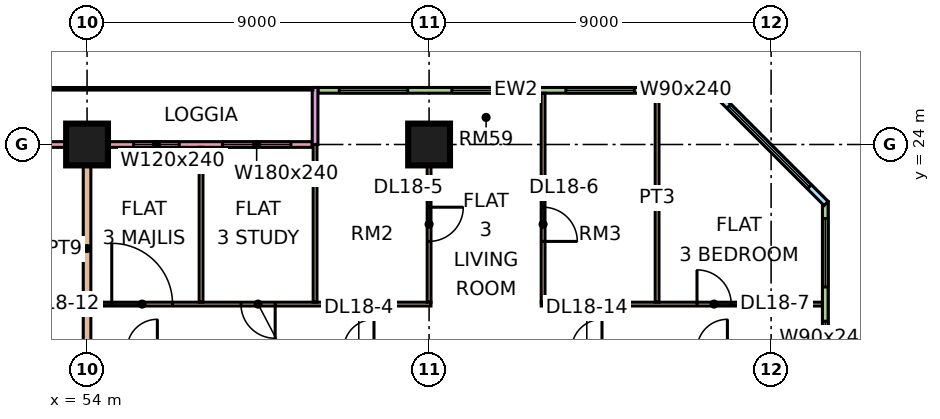
"""IFC4 building model, lengths in metres.
Left out: names, types, materials, properties, quantities, classifications, styles, units other than length and angle.
Written with IfcOpenShell. Run it as: python <this file> out.ifc"""

import sys

from ifc_helpers import new_model, si_unit, direction, frame, frame_2d, origin, origin_2d, place, context, subcontext, project, spatial, rectangle, extrude, element, fill, save


model = new_model("IFC4")
c1 = context("Model", 3, precision=1e-05, world=origin(), true_north=direction((0.0, 1.0)))
c2 = subcontext(c1, "Body", "Model", "MODEL_VIEW")
j1 = project(units=[si_unit("LENGTHUNIT", "METRE"), si_unit("PLANEANGLEUNIT", "RADIAN")], contexts=[c1])
p1 = place(None, origin())
s1 = spatial("IfcSite", under=j1, at=p1, CompositionType="ELEMENT")
p2 = place(p1, origin())
s2 = spatial("IfcBuilding", under=s1, at=p2, CompositionType="ELEMENT")
p3 = place(p2, frame((0.0, 0.0, 82.65)))
s3 = spatial("IfcBuildingStorey", under=s2, at=p3, CompositionType="ELEMENT", Elevation=82.65)
for number, where, z_axis, x_axis in (
    (1, (54.0, 24.0, 0.0), (0.0, 0.0, 1.0), (1.0, 0.0, 0.0)),
    (2, (63.0, 24.0, 0.0), (0.0, 0.0, 1.0), (1.0, 0.0, 0.0)),
):
    element("IfcColumn", number, at=place(p3, frame(where, z_axis=z_axis, x_axis=x_axis)), inside=s3, PredefinedType="COLUMN", context=c2, shape_type="SweptSolid", body=[
        extrude(rectangle(XDim=1.1, YDim=1.1, at=origin_2d()), origin(), (0.0, 0.0, 1.0), 3.75),
    ])
p4 = place(p3, frame((70.5, 25.425, 0.0), z_axis=(0.0, 0.0, 1.0), x_axis=(-1.0, 0.0, 0.0)))
e3 = element("IfcWall", 3, at=p4, inside=s3, PredefinedType="SOLIDWALL", context=c2, shape_type="SweptSolid", body=[
    extrude(rectangle(XDim=10.425, YDim=0.15, at=frame_2d((5.212, 0.0))), origin(), (0.0, 0.0, 1.0), 3.3),
])
p5 = place(p4, frame((0.3, 0.0, 0.45)))
e4 = element("IfcOpeningElement", 4, at=p5, cuts=e3, PredefinedType="OPENING", context=c2, shape_type="SweptSolid", body=[
    extrude(rectangle(XDim=0.9, YDim=2.4, at=frame_2d((0.45, 1.2))), frame((0.0, 0.085, 0.0), z_axis=(0.0, -1.0, 0.0), x_axis=(1.0, 0.0, 0.0)), (0.0, 0.0, 1.0), 0.17),
])
p6 = place(p4, frame((2.1, 0.0, 0.45)))
e5 = element("IfcOpeningElement", 5, at=p6, cuts=e3, PredefinedType="OPENING", context=c2, shape_type="SweptSolid", body=[
    extrude(rectangle(XDim=1.8, YDim=2.4, at=frame_2d((0.9, 1.2))), frame((0.0, 0.085, 0.0), z_axis=(0.0, -1.0, 0.0), x_axis=(1.0, 0.0, 0.0)), (0.0, 0.0, 1.0), 0.17),
])
p7 = place(p4, frame((5.1, 0.0, 0.45)))
e6 = element("IfcOpeningElement", 6, at=p7, cuts=e3, PredefinedType="OPENING", context=c2, shape_type="SweptSolid", body=[
    extrude(rectangle(XDim=1.8, YDim=2.4, at=frame_2d((0.9, 1.2))), frame((0.0, 0.085, 0.0), z_axis=(0.0, -1.0, 0.0), x_axis=(1.0, 0.0, 0.0)), (0.0, 0.0, 1.0), 0.17),
])
p8 = place(p4, frame((8.062, 0.0, 0.45)))
e7 = element("IfcOpeningElement", 7, at=p8, cuts=e3, PredefinedType="OPENING", context=c2, shape_type="SweptSolid", body=[
    extrude(rectangle(XDim=1.8, YDim=2.4, at=frame_2d((0.9, 1.2))), frame((0.0, 0.085, 0.0), z_axis=(0.0, -1.0, 0.0), x_axis=(1.0, 0.0, 0.0)), (0.0, 0.0, 1.0), 0.17),
])
p9 = place(p3, frame((59.925, 24.0, 0.0), z_axis=(0.0, 0.0, 1.0), x_axis=(-1.0, 0.0, 0.0)))
e8 = element("IfcWall", 8, at=p9, inside=s3, PredefinedType="SOLIDWALL", context=c2, shape_type="SweptSolid", body=[
    extrude(rectangle(XDim=11.85, YDim=0.15, at=frame_2d((5.925, 0.0))), origin(), (0.0, 0.0, 1.0), 3.3),
])
p10 = place(p9, frame((0.562, 0.0, 0.45)))
e9 = element("IfcOpeningElement", 9, at=p10, cuts=e8, PredefinedType="OPENING", context=c2, shape_type="SweptSolid", body=[
    extrude(rectangle(XDim=1.8, YDim=2.4, at=frame_2d((0.9, 1.2))), frame((0.0, 0.085, 0.0), z_axis=(0.0, -1.0, 0.0), x_axis=(1.0, 0.0, 0.0)), (0.0, 0.0, 1.0), 0.17),
])
p11 = place(p9, frame((3.5, 0.0, 0.45)))
e10 = element("IfcOpeningElement", 10, at=p11, cuts=e8, PredefinedType="OPENING", context=c2, shape_type="SweptSolid", body=[
    extrude(rectangle(XDim=1.2, YDim=2.4, at=frame_2d((0.6, 1.2))), frame((0.0, 0.085, 0.0), z_axis=(0.0, -1.0, 0.0), x_axis=(1.0, 0.0, 0.0)), (0.0, 0.0, 1.0), 0.17),
])
p12 = place(p9, frame((7.113, 0.0, 0.45)))
e11 = element("IfcOpeningElement", 11, at=p12, cuts=e8, PredefinedType="OPENING", context=c2, shape_type="SweptSolid", body=[
    extrude(rectangle(XDim=4.2, YDim=2.4, at=frame_2d((2.1, 1.2))), frame((0.0, 0.085, 0.0), z_axis=(0.0, -1.0, 0.0), x_axis=(1.0, 0.0, 0.0)), (0.0, 0.0, 1.0), 0.17),
])
p13 = place(p3, frame((60.0, 25.5, 0.0), z_axis=(0.0, 0.0, 1.0), x_axis=(0.0, -1.0, 0.0)))
e12 = element("IfcWall", 12, at=p13, inside=s3, PredefinedType="SOLIDWALL", context=c2, shape_type="SweptSolid", body=[
    extrude(rectangle(XDim=1.5, YDim=0.15, at=frame_2d((0.75, 0.0))), origin(), (0.0, 0.0, 1.0), 3.3),
])
p14 = place(p3, frame((73.425, 12.075, 0.0), z_axis=(0.0, 0.0, 1.0), x_axis=(0.0, 1.0, 0.0)))
e13 = element("IfcWall", 13, at=p14, inside=s3, PredefinedType="SOLIDWALL", context=c2, shape_type="SweptSolid", body=[
    extrude(rectangle(XDim=10.425, YDim=0.15, at=frame_2d((5.212, 0.0))), origin(), (0.0, 0.0, 1.0), 3.3),
])
p15 = place(p14, frame((6.375, 0.0, 0.45)))
e14 = element("IfcOpeningElement", 14, at=p15, cuts=e13, PredefinedType="OPENING", context=c2, shape_type="SweptSolid", body=[
    extrude(rectangle(XDim=0.9, YDim=2.4, at=frame_2d((0.45, 1.2))), frame((0.0, 0.085, 0.0), z_axis=(0.0, -1.0, 0.0), x_axis=(1.0, 0.0, 0.0)), (0.0, 0.0, 1.0), 0.17),
])
p16 = place(p14, frame((8.175, 0.0, 0.45)))
e15 = element("IfcOpeningElement", 15, at=p16, cuts=e13, PredefinedType="OPENING", context=c2, shape_type="SweptSolid", body=[
    extrude(rectangle(XDim=1.8, YDim=2.4, at=frame_2d((0.9, 1.2))), frame((0.0, 0.085, 0.0), z_axis=(0.0, -1.0, 0.0), x_axis=(1.0, 0.0, 0.0)), (0.0, 0.0, 1.0), 0.17),
])
p17 = place(p3, frame((73.447, 22.447, 0.0), z_axis=(0.0, 0.0, 1.0), x_axis=(-0.707106781187, 0.707106781187, 0.0)))
e16 = element("IfcWall", 16, at=p17, inside=s3, PredefinedType="SOLIDWALL", context=c2, shape_type="SweptSolid", body=[
    extrude(rectangle(XDim=4.243, YDim=0.15, at=frame_2d((2.121, 0.0))), origin(), (0.0, 0.0, 1.0), 3.3),
])
p18 = place(p17, frame((0.621, 0.0, 0.45)))
e17 = element("IfcOpeningElement", 17, at=p18, cuts=e16, PredefinedType="OPENING", context=c2, shape_type="SweptSolid", body=[
    extrude(rectangle(XDim=3.0, YDim=2.4, at=frame_2d((1.5, 1.2))), frame((0.0, 0.085, 0.0), z_axis=(0.0, -1.0, 0.0), x_axis=(1.0, 0.0, 0.0)), (0.0, 0.0, 1.0), 0.17),
])
p19 = place(p3, frame((54.0, 18.6, 0.0), z_axis=(0.0, 0.0, 1.0), x_axis=(0.0, 1.0, 0.0)))
e18 = element("IfcWall", 18, at=p19, inside=s3, PredefinedType="PARTITIONING", context=c2, shape_type="SweptSolid", body=[
    extrude(rectangle(XDim=5.326, YDim=0.2, at=frame_2d((2.663, 0.0))), origin(), (0.0, 0.0, 1.0), 3.3),
])
p20 = place(p3, frame((54.1, 19.8, 0.0), z_axis=(0.0, 0.0, 1.0), x_axis=(1.0, 0.0, 0.0)))
e19 = element("IfcWall", 19, at=p20, inside=s3, PredefinedType="PARTITIONING", context=c2, shape_type="SweptSolid", body=[
    extrude(rectangle(XDim=8.95, YDim=0.1, at=frame_2d((4.475, 0.0))), origin(), (0.0, 0.0, 1.0), 3.3),
])
p21 = place(p20, frame((0.55, 0.0, 0.0)))
e20 = element("IfcOpeningElement", 20, at=p21, cuts=e19, PredefinedType="OPENING", context=c2, shape_type="SweptSolid", body=[
    extrude(rectangle(XDim=1.6, YDim=2.1, at=frame_2d((0.8, 1.05))), frame((0.0, 0.06, 0.0), z_axis=(0.0, -1.0, 0.0), x_axis=(1.0, 0.0, 0.0)), (0.0, 0.0, 1.0), 0.12),
])
p22 = place(p20, frame((3.95, 0.0, 0.0)))
e21 = element("IfcOpeningElement", 21, at=p22, cuts=e19, PredefinedType="OPENING", context=c2, shape_type="SweptSolid", body=[
    extrude(rectangle(XDim=0.9, YDim=2.1, at=frame_2d((0.45, 1.05))), frame((0.0, 0.06, 0.0), z_axis=(0.0, -1.0, 0.0), x_axis=(1.0, 0.0, 0.0)), (0.0, 0.0, 1.0), 0.12),
])
p23 = place(p3, frame((57.0, 19.85, 0.0), z_axis=(0.0, 0.0, 1.0), x_axis=(0.0, 1.0, 0.0)))
e22 = element("IfcWall", 22, at=p23, inside=s3, PredefinedType="PARTITIONING", context=c2, shape_type="SweptSolid", body=[
    extrude(rectangle(XDim=4.076, YDim=0.1, at=frame_2d((2.038, 0.0))), origin(), (0.0, 0.0, 1.0), 3.3),
])
p24 = place(p3, frame((60.0, 19.85, 0.0), z_axis=(0.0, 0.0, 1.0), x_axis=(0.0, 1.0, 0.0)))
e23 = element("IfcWall", 23, at=p24, inside=s3, PredefinedType="PARTITIONING", context=c2, shape_type="SweptSolid", body=[
    extrude(rectangle(XDim=4.15, YDim=0.1, at=frame_2d((2.075, 0.0))), origin(), (0.0, 0.0, 1.0), 3.3),
])
p25 = place(p3, frame((63.0, 19.85, 0.0), z_axis=(0.0, 0.0, 1.0), x_axis=(0.0, 1.0, 0.0)))
e24 = element("IfcWall", 24, at=p25, inside=s3, PredefinedType="PARTITIONING", context=c2, shape_type="SweptSolid", body=[
    extrude(rectangle(XDim=4.15, YDim=0.1, at=frame_2d((2.075, 0.0))), origin(), (0.0, 0.0, 1.0), 3.3),
])
p26 = place(p25, frame((1.6, 0.0, 0.0)))
e25 = element("IfcOpeningElement", 25, at=p26, cuts=e24, PredefinedType="OPENING", context=c2, shape_type="SweptSolid", body=[
    extrude(rectangle(XDim=0.9, YDim=2.1, at=frame_2d((0.45, 1.05))), frame((0.0, 0.06, 0.0), z_axis=(0.0, -1.0, 0.0), x_axis=(1.0, 0.0, 0.0)), (0.0, 0.0, 1.0), 0.12),
])
p27 = place(p3, frame((65.95, 19.8, 0.0), z_axis=(0.0, 0.0, 1.0), x_axis=(1.0, 0.0, 0.0)))
e26 = element("IfcWall", 26, at=p27, inside=s3, PredefinedType="PARTITIONING", context=c2, shape_type="SweptSolid", body=[
    extrude(rectangle(XDim=7.401, YDim=0.1, at=frame_2d((3.701, 0.0))), origin(), (0.0, 0.0, 1.0), 3.3),
])
p28 = place(p27, frame((4.1, 0.0, 0.0)))
e27 = element("IfcOpeningElement", 27, at=p28, cuts=e26, PredefinedType="OPENING", context=c2, shape_type="SweptSolid", body=[
    extrude(rectangle(XDim=0.9, YDim=2.1, at=frame_2d((0.45, 1.05))), frame((0.0, 0.06, 0.0), z_axis=(0.0, -1.0, 0.0), x_axis=(1.0, 0.0, 0.0)), (0.0, 0.0, 1.0), 0.12),
])
p29 = place(p3, frame((66.0, 19.85, 0.0), z_axis=(0.0, 0.0, 1.0), x_axis=(0.0, 1.0, 0.0)))
e28 = element("IfcWall", 28, at=p29, inside=s3, PredefinedType="PARTITIONING", context=c2, shape_type="SweptSolid", body=[
    extrude(rectangle(XDim=5.5, YDim=0.1, at=frame_2d((2.75, 0.0))), origin(), (0.0, 0.0, 1.0), 3.3),
])
p30 = place(p29, frame((1.6, 0.0, 0.0)))
e29 = element("IfcOpeningElement", 29, at=p30, cuts=e28, PredefinedType="OPENING", context=c2, shape_type="SweptSolid", body=[
    extrude(rectangle(XDim=0.9, YDim=2.1, at=frame_2d((0.45, 1.05))), frame((0.0, 0.06, 0.0), z_axis=(0.0, -1.0, 0.0), x_axis=(1.0, 0.0, 0.0)), (0.0, 0.0, 1.0), 0.12),
])
p31 = place(p3, frame((69.0, 19.85, 0.0), z_axis=(0.0, 0.0, 1.0), x_axis=(0.0, 1.0, 0.0)))
e30 = element("IfcWall", 30, at=p31, inside=s3, PredefinedType="PARTITIONING", context=c2, shape_type="SweptSolid", body=[
    extrude(rectangle(XDim=5.501, YDim=0.1, at=frame_2d((2.75, 0.0))), origin(), (0.0, 0.0, 1.0), 3.3),
])
p32 = place(p5, origin())
e31 = element("IfcWindow", 31, at=p32, inside=s3, PartitioningType="SINGLE_PANEL", PredefinedType="WINDOW", context=c2, shape_type="SweptSolid", body=[
    extrude(rectangle(XDim=0.9, YDim=2.4, at=frame_2d((0.45, 1.2))), frame((0.0, 0.03, 0.0), z_axis=(0.0, -1.0, 0.0), x_axis=(1.0, 0.0, 0.0)), (0.0, 0.0, 1.0), 0.06),
])
fill(e4, e31)
p33 = place(p6, origin())
e32 = element("IfcWindow", 32, at=p33, inside=s3, PartitioningType="SINGLE_PANEL", PredefinedType="WINDOW", context=c2, shape_type="SweptSolid", body=[
    extrude(rectangle(XDim=1.8, YDim=2.4, at=frame_2d((0.9, 1.2))), frame((0.0, 0.03, 0.0), z_axis=(0.0, -1.0, 0.0), x_axis=(1.0, 0.0, 0.0)), (0.0, 0.0, 1.0), 0.06),
])
fill(e5, e32)
p34 = place(p7, origin())
e33 = element("IfcWindow", 33, at=p34, inside=s3, PartitioningType="SINGLE_PANEL", PredefinedType="WINDOW", context=c2, shape_type="SweptSolid", body=[
    extrude(rectangle(XDim=1.8, YDim=2.4, at=frame_2d((0.9, 1.2))), frame((0.0, 0.03, 0.0), z_axis=(0.0, -1.0, 0.0), x_axis=(1.0, 0.0, 0.0)), (0.0, 0.0, 1.0), 0.06),
])
fill(e6, e33)
p35 = place(p8, origin())
e34 = element("IfcWindow", 34, at=p35, inside=s3, PartitioningType="SINGLE_PANEL", PredefinedType="WINDOW", context=c2, shape_type="SweptSolid", body=[
    extrude(rectangle(XDim=1.8, YDim=2.4, at=frame_2d((0.9, 1.2))), frame((0.0, 0.03, 0.0), z_axis=(0.0, -1.0, 0.0), x_axis=(1.0, 0.0, 0.0)), (0.0, 0.0, 1.0), 0.06),
])
fill(e7, e34)
p36 = place(p10, origin())
e35 = element("IfcWindow", 35, at=p36, inside=s3, PartitioningType="SINGLE_PANEL", PredefinedType="WINDOW", context=c2, shape_type="SweptSolid", body=[
    extrude(rectangle(XDim=1.8, YDim=2.4, at=frame_2d((0.9, 1.2))), frame((0.0, 0.03, 0.0), z_axis=(0.0, -1.0, 0.0), x_axis=(1.0, 0.0, 0.0)), (0.0, 0.0, 1.0), 0.06),
])
fill(e9, e35)
p37 = place(p11, origin())
e36 = element("IfcWindow", 36, at=p37, inside=s3, PartitioningType="SINGLE_PANEL", PredefinedType="WINDOW", context=c2, shape_type="SweptSolid", body=[
    extrude(rectangle(XDim=1.2, YDim=2.4, at=frame_2d((0.6, 1.2))), frame((0.0, 0.03, 0.0), z_axis=(0.0, -1.0, 0.0), x_axis=(1.0, 0.0, 0.0)), (0.0, 0.0, 1.0), 0.06),
])
fill(e10, e36)
p38 = place(p15, origin())
e37 = element("IfcWindow", 37, at=p38, inside=s3, PartitioningType="SINGLE_PANEL", PredefinedType="WINDOW", context=c2, shape_type="SweptSolid", body=[
    extrude(rectangle(XDim=0.9, YDim=2.4, at=frame_2d((0.45, 1.2))), frame((0.0, 0.03, 0.0), z_axis=(0.0, -1.0, 0.0), x_axis=(1.0, 0.0, 0.0)), (0.0, 0.0, 1.0), 0.06),
])
fill(e14, e37)
p39 = place(p16, origin())
e38 = element("IfcWindow", 38, at=p39, inside=s3, PartitioningType="SINGLE_PANEL", PredefinedType="WINDOW", context=c2, shape_type="SweptSolid", body=[
    extrude(rectangle(XDim=1.8, YDim=2.4, at=frame_2d((0.9, 1.2))), frame((0.0, 0.03, 0.0), z_axis=(0.0, -1.0, 0.0), x_axis=(1.0, 0.0, 0.0)), (0.0, 0.0, 1.0), 0.06),
])
fill(e15, e38)
p40 = place(p18, origin())
e39 = element("IfcWindow", 39, at=p40, inside=s3, PartitioningType="SINGLE_PANEL", PredefinedType="WINDOW", context=c2, shape_type="SweptSolid", body=[
    extrude(rectangle(XDim=3.0, YDim=2.4, at=frame_2d((1.5, 1.2))), frame((0.0, 0.03, 0.0), z_axis=(0.0, -1.0, 0.0), x_axis=(1.0, 0.0, 0.0)), (0.0, 0.0, 1.0), 0.06),
])
fill(e17, e39)
p41 = place(p26, origin())
e40 = element("IfcDoor", 40, at=p41, inside=s3, OperationType="SINGLE_SWING_RIGHT", PredefinedType="DOOR", context=c2, shape_type="SweptSolid", body=[
    extrude(rectangle(XDim=0.9, YDim=2.1, at=frame_2d((0.45, 1.05))), frame((0.0, 0.025, 0.0), z_axis=(0.0, -1.0, 0.0), x_axis=(1.0, 0.0, 0.0)), (0.0, 0.0, 1.0), 0.05),
])
fill(e25, e40)
p42 = place(p30, frame((0.9, 0.0, 0.0), z_axis=(0.0, 0.0, 1.0), x_axis=(-1.0, 0.0, 0.0)))
e41 = element("IfcDoor", 41, at=p42, inside=s3, OperationType="SINGLE_SWING_LEFT", PredefinedType="DOOR", context=c2, shape_type="SweptSolid", body=[
    extrude(rectangle(XDim=0.9, YDim=2.1, at=frame_2d((0.45, 1.05))), frame((0.0, 0.025, 0.0), z_axis=(0.0, -1.0, 0.0), x_axis=(1.0, 0.0, 0.0)), (0.0, 0.0, 1.0), 0.05),
])
fill(e29, e41)
p43 = place(p28, origin())
e42 = element("IfcDoor", 42, at=p43, inside=s3, OperationType="SINGLE_SWING_LEFT", PredefinedType="DOOR", context=c2, shape_type="SweptSolid", body=[
    extrude(rectangle(XDim=0.9, YDim=2.1, at=frame_2d((0.45, 1.05))), frame((0.0, 0.025, 0.0), z_axis=(0.0, -1.0, 0.0), x_axis=(1.0, 0.0, 0.0)), (0.0, 0.0, 1.0), 0.05),
])
fill(e27, e42)
p44 = place(p21, origin())
e43 = element("IfcDoor", 43, at=p44, inside=s3, OperationType="DOUBLE_DOOR_SINGLE_SWING", PredefinedType="DOOR", context=c2, shape_type="SweptSolid", body=[
    extrude(rectangle(XDim=1.6, YDim=2.1, at=frame_2d((0.8, 1.05))), frame((0.0, 0.025, 0.0), z_axis=(0.0, -1.0, 0.0), x_axis=(1.0, 0.0, 0.0)), (0.0, 0.0, 1.0), 0.05),
])
fill(e20, e43)
p45 = place(p22, origin())
e44 = element("IfcDoor", 44, at=p45, inside=s3, OperationType="SINGLE_SWING_RIGHT", PredefinedType="DOOR", context=c2, shape_type="SweptSolid", body=[
    extrude(rectangle(XDim=0.9, YDim=2.1, at=frame_2d((0.45, 1.05))), frame((0.0, 0.025, 0.0), z_axis=(0.0, -1.0, 0.0), x_axis=(1.0, 0.0, 0.0)), (0.0, 0.0, 1.0), 0.05),
])
fill(e21, e44)
save(model, sys.argv[1])
